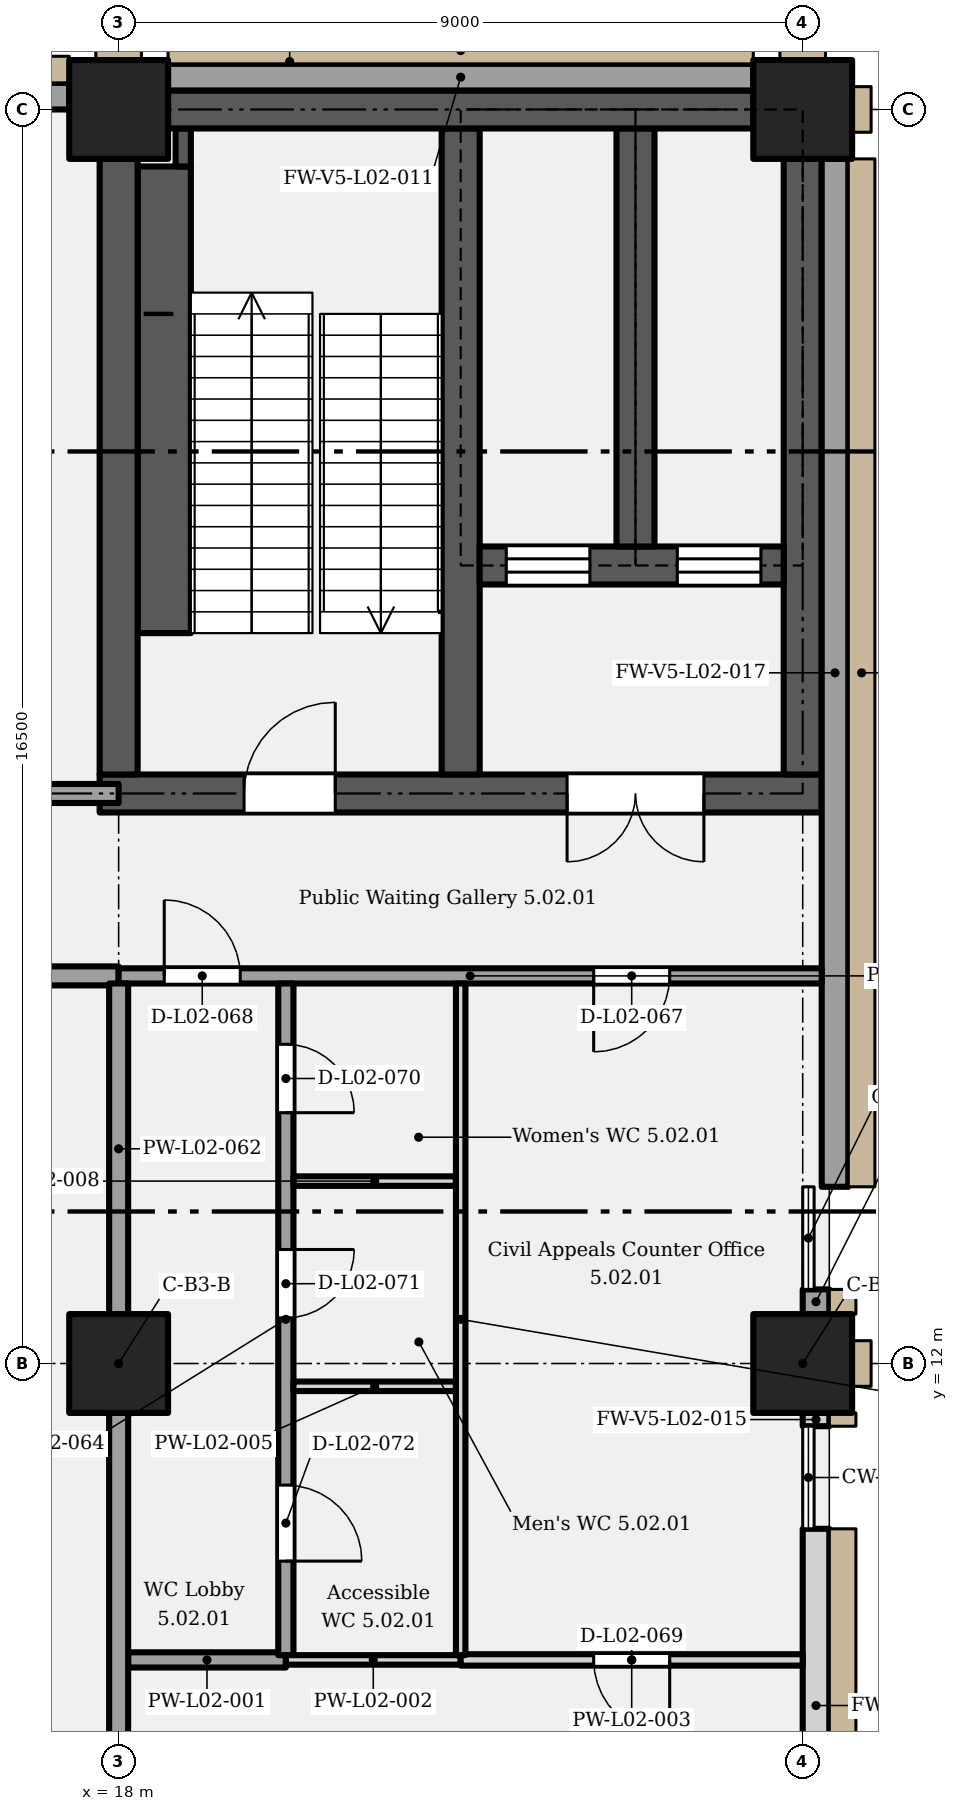
"""IFC4 building model, lengths in metres.
Left out: names, types, materials, properties, quantities, classifications, styles, units other than length and angle.
Written with IfcOpenShell. Run it as: python <this file> out.ifc"""

import sys

from ifc_helpers import new_model, si_unit, direction, frame, frame_2d, origin, origin_2d, place, context, subcontext, project, spatial, rectangle, extrude, element, fill, save


model = new_model("IFC4")
c1 = context("Model", 3, precision=1e-05, world=origin(), true_north=direction((0.0, 1.0)))
c2 = subcontext(c1, "Body", "Model", "MODEL_VIEW")
j1 = project(units=[si_unit("LENGTHUNIT", "METRE"), si_unit("PLANEANGLEUNIT", "RADIAN")], contexts=[c1])
p1 = place(None, origin())
s1 = spatial("IfcSite", under=j1, at=p1, CompositionType="ELEMENT")
p2 = place(p1, origin())
s2 = spatial("IfcBuilding", under=s1, at=p2, CompositionType="ELEMENT")
p3 = place(p2, frame((0.0, 0.0, 12.0)))
s3 = spatial("IfcBuildingStorey", under=s2, at=p3, CompositionType="ELEMENT", Elevation=12.0)
for number, where, z_axis, x_axis in (
    (1, (18.0, 12.0, 0.0), (0.0, 0.0, 1.0), (1.0, 0.0, 0.0)),
    (2, (27.0, 12.0, 0.0), (0.0, 0.0, 1.0), (1.0, 0.0, 0.0)),
    (3, (18.0, 28.5, 0.0), (0.0, 0.0, 1.0), (1.0, 0.0, 0.0)),
    (4, (27.0, 28.5, 0.0), (0.0, 0.0, 1.0), (1.0, 0.0, 0.0)),
):
    element("IfcColumn", number, at=place(p3, frame(where, z_axis=z_axis, x_axis=x_axis)), inside=s3, PredefinedType="COLUMN", context=c2, shape_type="SweptSolid", body=[
        extrude(rectangle(XDim=1.3, YDim=1.3, at=origin_2d()), origin(), (0.0, 0.0, 1.0), 5.4),
    ])
p4 = place(p3, frame((17.75, 19.5, 0.0), z_axis=(0.0, 0.0, 1.0), x_axis=(1.0, 0.0, 0.0)))
e5 = element("IfcWall", 5, at=p4, inside=s3, PredefinedType="SHEAR", context=c2, shape_type="SweptSolid", body=[
    extrude(rectangle(XDim=9.5, YDim=0.5, at=frame_2d((4.75, 0.0))), origin(), (0.0, 0.0, 1.0), 5.15),
])
p5 = place(p4, frame((1.9, 0.0, 0.0)))
e6 = element("IfcOpeningElement", 6, at=p5, cuts=e5, PredefinedType="OPENING", context=c2, shape_type="SweptSolid", body=[
    extrude(rectangle(XDim=1.2, YDim=2.1, at=frame_2d((0.6, 1.05))), frame((0.0, 0.26, 0.0), z_axis=(0.0, -1.0, 0.0), x_axis=(1.0, 0.0, 0.0)), (0.0, 0.0, 1.0), 0.52),
])
p6 = place(p4, frame((7.95, 0.0, 0.0), z_axis=(0.0, 0.0, 1.0), x_axis=(-1.0, 0.0, 0.0)))
e7 = element("IfcOpeningElement", 7, at=p6, cuts=e5, PredefinedType="OPENING", context=c2, shape_type="SweptSolid", body=[
    extrude(rectangle(XDim=1.8, YDim=2.1, at=frame_2d((0.9, 1.05))), frame((0.0, 0.26, 0.0), z_axis=(0.0, -1.0, 0.0), x_axis=(1.0, 0.0, 0.0)), (0.0, 0.0, 1.0), 0.52),
])
p7 = place(p3, frame((18.0, 19.75, 0.0), z_axis=(0.0, 0.0, 1.0), x_axis=(0.0, 1.0, 0.0)))
e8 = element("IfcWall", 8, at=p7, inside=s3, PredefinedType="SHEAR", context=c2, shape_type="SweptSolid", body=[
    extrude(rectangle(XDim=8.1, YDim=0.5, at=frame_2d((4.05, 0.0))), origin(), (0.0, 0.0, 1.0), 5.15),
])
p8 = place(p3, frame((22.5, 19.75, 0.0), z_axis=(0.0, 0.0, 1.0), x_axis=(0.0, 1.0, 0.0)))
e9 = element("IfcWall", 9, at=p8, inside=s3, PredefinedType="SHEAR", context=c2, shape_type="SweptSolid", body=[
    extrude(rectangle(XDim=8.5, YDim=0.5, at=frame_2d((4.25, 0.0))), origin(), (0.0, 0.0, 1.0), 5.15),
])
p9 = place(p3, frame((27.0, 19.75, 0.0), z_axis=(0.0, 0.0, 1.0), x_axis=(0.0, 1.0, 0.0)))
e10 = element("IfcWall", 10, at=p9, inside=s3, PredefinedType="SHEAR", context=c2, shape_type="SweptSolid", body=[
    extrude(rectangle(XDim=8.1, YDim=0.5, at=frame_2d((4.05, 0.0))), origin(), (0.0, 0.0, 1.0), 5.15),
])
p10 = place(p3, frame((22.75, 22.5, 0.0), z_axis=(0.0, 0.0, 1.0), x_axis=(1.0, 0.0, 0.0)))
e11 = element("IfcWall", 11, at=p10, inside=s3, PredefinedType="SHEAR", context=c2, shape_type="SweptSolid", body=[
    extrude(rectangle(XDim=4.0, YDim=0.5, at=frame_2d((2.0, 0.0))), origin(), (0.0, 0.0, 1.0), 5.15),
])
p11 = place(p10, frame((0.35, 0.0, 0.0)))
e12 = element("IfcOpeningElement", 12, at=p11, cuts=e11, PredefinedType="OPENING", context=c2, shape_type="SweptSolid", body=[
    extrude(rectangle(XDim=1.1, YDim=2.1, at=frame_2d((0.55, 1.05))), frame((0.0, 0.26, 0.0), z_axis=(0.0, -1.0, 0.0), x_axis=(1.0, 0.0, 0.0)), (0.0, 0.0, 1.0), 0.52),
])
p12 = place(p10, frame((2.6, 0.0, 0.0)))
e13 = element("IfcOpeningElement", 13, at=p12, cuts=e11, PredefinedType="OPENING", context=c2, shape_type="SweptSolid", body=[
    extrude(rectangle(XDim=1.1, YDim=2.1, at=frame_2d((0.55, 1.05))), frame((0.0, 0.26, 0.0), z_axis=(0.0, -1.0, 0.0), x_axis=(1.0, 0.0, 0.0)), (0.0, 0.0, 1.0), 0.52),
])
p13 = place(p3, frame((24.8, 22.75, 0.0), z_axis=(0.0, 0.0, 1.0), x_axis=(0.0, 1.0, 0.0)))
e14 = element("IfcWall", 14, at=p13, inside=s3, PredefinedType="SHEAR", context=c2, shape_type="SweptSolid", body=[
    extrude(rectangle(XDim=5.5, YDim=0.5, at=frame_2d((2.75, 0.0))), origin(), (0.0, 0.0, 1.0), 5.15),
])
p14 = place(p3, frame((18.65, 28.5, 0.0), z_axis=(0.0, 0.0, 1.0), x_axis=(1.0, 0.0, 0.0)))
e15 = element("IfcWall", 15, at=p14, inside=s3, PredefinedType="SHEAR", context=c2, shape_type="SweptSolid", body=[
    extrude(rectangle(XDim=7.7, YDim=0.5, at=frame_2d((3.85, 0.0))), origin(), (0.0, 0.0, 1.0), 5.15),
])
for number, where, z_axis, x_axis in (
    (16, (9.65, 28.675, 0.0), (0.0, 0.0, 1.0), (1.0, 0.0, 0.0)),
    (17, (18.65, 28.925, 0.0), (0.0, 0.0, 1.0), (1.0, 0.0, 0.0)),
):
    element("IfcWall", number, at=place(p3, frame(where, z_axis=z_axis, x_axis=x_axis)), inside=s3, PredefinedType="SOLIDWALL", context=c2, shape_type="SweptSolid", body=[
        extrude(rectangle(XDim=7.7, YDim=0.35, at=frame_2d((3.85, 0.0))), origin(), (0.0, 0.0, 1.0), 5.15),
    ])
p15 = place(p3, frame((27.175, 5.175, 0.0), z_axis=(0.0, 0.0, 1.0), x_axis=(0.0, 1.0, 0.0)))
e18 = element("IfcWall", 18, at=p15, inside=s3, PredefinedType="SOLIDWALL", context=c2, shape_type="SweptSolid", body=[
    extrude(rectangle(XDim=4.65, YDim=0.35, at=frame_2d((2.325, 0.0))), origin(), (0.0, 0.0, 1.0), 5.15),
])
p16 = place(p3, frame((27.175, 11.175, 0.0), z_axis=(0.0, 0.0, 1.0), x_axis=(0.0, 1.0, 0.0)))
e19 = element("IfcWall", 19, at=p16, inside=s3, PredefinedType="SOLIDWALL", context=c2, shape_type="SweptSolid", body=[
    extrude(rectangle(XDim=0.175, YDim=0.35, at=frame_2d((0.087, 0.0))), origin(), (0.0, 0.0, 1.0), 5.15),
])
p17 = place(p3, frame((27.175, 12.65, 0.0), z_axis=(0.0, 0.0, 1.0), x_axis=(0.0, 1.0, 0.0)))
e20 = element("IfcWall", 20, at=p17, inside=s3, PredefinedType="SOLIDWALL", context=c2, shape_type="SweptSolid", body=[
    extrude(rectangle(XDim=0.325, YDim=0.35, at=frame_2d((0.163, 0.0))), origin(), (0.0, 0.0, 1.0), 5.15),
])
p18 = place(p3, frame((27.425, 14.325, 0.0), z_axis=(0.0, 0.0, 1.0), x_axis=(0.0, 1.0, 0.0)))
e21 = element("IfcWall", 21, at=p18, inside=s3, PredefinedType="SOLIDWALL", context=c2, shape_type="SweptSolid", body=[
    extrude(rectangle(XDim=13.525, YDim=0.35, at=frame_2d((6.763, 0.0))), origin(), (0.0, 0.0, 1.0), 5.15),
])
p19 = place(p3, frame((18.125, 8.1, 0.0), z_axis=(0.0, 0.0, 1.0), x_axis=(1.0, 0.0, 0.0)))
e22 = element("IfcWall", 22, at=p19, inside=s3, PredefinedType="PARTITIONING", context=c2, shape_type="SweptSolid", body=[
    extrude(rectangle(XDim=2.075, YDim=0.2, at=frame_2d((1.038, 0.0))), origin(), (0.0, 0.0, 1.0), 5.15),
])
p20 = place(p3, frame((20.2, 8.1, 0.0), z_axis=(0.0, 0.0, 1.0), x_axis=(1.0, 0.0, 0.0)))
e23 = element("IfcWall", 23, at=p20, inside=s3, PredefinedType="PARTITIONING", context=c2, shape_type="SweptSolid", body=[
    extrude(rectangle(XDim=2.3, YDim=0.125, at=frame_2d((1.15, 0.0))), origin(), (0.0, 0.0, 1.0), 5.15),
])
p21 = place(p3, frame((22.5, 8.1, 0.0), z_axis=(0.0, 0.0, 1.0), x_axis=(1.0, 0.0, 0.0)))
e24 = element("IfcWall", 24, at=p21, inside=s3, PredefinedType="PARTITIONING", context=c2, shape_type="SweptSolid", body=[
    extrude(rectangle(XDim=4.5, YDim=0.15, at=frame_2d((2.25, 0.0))), origin(), (0.0, 0.0, 1.0), 5.15),
])
p22 = place(p21, frame((2.75, 0.0, 0.0), z_axis=(0.0, 0.0, 1.0), x_axis=(-1.0, 0.0, 0.0)))
e25 = element("IfcOpeningElement", 25, at=p22, cuts=e24, PredefinedType="OPENING", context=c2, shape_type="SweptSolid", body=[
    extrude(rectangle(XDim=1.0, YDim=2.1, at=frame_2d((0.5, 1.05))), frame((0.0, 0.085, 0.0), z_axis=(0.0, -1.0, 0.0), x_axis=(1.0, 0.0, 0.0)), (0.0, 0.0, 1.0), 0.17),
])
p23 = place(p3, frame((20.3, 11.7, 0.0), z_axis=(0.0, 0.0, 1.0), x_axis=(1.0, 0.0, 0.0)))
e26 = element("IfcWall", 26, at=p23, inside=s3, PredefinedType="PARTITIONING", context=c2, shape_type="SweptSolid", body=[
    extrude(rectangle(XDim=2.137, YDim=0.125, at=frame_2d((1.069, 0.0))), origin(), (0.0, 0.0, 1.0), 4.4),
])
p24 = place(p3, frame((20.3, 14.4, 0.0), z_axis=(0.0, 0.0, 1.0), x_axis=(1.0, 0.0, 0.0)))
e27 = element("IfcWall", 27, at=p24, inside=s3, PredefinedType="PARTITIONING", context=c2, shape_type="SweptSolid", body=[
    extrude(rectangle(XDim=2.137, YDim=0.125, at=frame_2d((1.069, 0.0))), origin(), (0.0, 0.0, 1.0), 5.15),
])
p25 = place(p3, frame((9.0, 17.1, 0.0), z_axis=(0.0, 0.0, 1.0), x_axis=(1.0, 0.0, 0.0)))
e28 = element("IfcWall", 28, at=p25, inside=s3, PredefinedType="PARTITIONING", context=c2, shape_type="SweptSolid", body=[
    extrude(rectangle(XDim=9.0, YDim=0.25, at=frame_2d((4.5, 0.0))), origin(), (0.0, 0.0, 1.0), 5.15),
])
p26 = place(p25, frame((6.9, 0.0, 0.0), z_axis=(0.0, 0.0, 1.0), x_axis=(-1.0, 0.0, 0.0)))
e29 = element("IfcOpeningElement", 29, at=p26, cuts=e28, PredefinedType="OPENING", context=c2, shape_type="SweptSolid", body=[
    extrude(rectangle(XDim=1.8, YDim=2.4, at=frame_2d((0.9, 1.2))), frame((0.0, 0.135, 0.0), z_axis=(0.0, -1.0, 0.0), x_axis=(1.0, 0.0, 0.0)), (0.0, 0.0, 1.0), 0.27),
])
p27 = place(p25, frame((2.0, 0.0, 0.0), z_axis=(0.0, 0.0, 1.0), x_axis=(-1.0, 0.0, 0.0)))
e30 = element("IfcOpeningElement", 30, at=p27, cuts=e28, PredefinedType="OPENING", context=c2, shape_type="SweptSolid", body=[
    extrude(rectangle(XDim=1.0, YDim=2.1, at=frame_2d((0.5, 1.05))), frame((0.0, 0.135, 0.0), z_axis=(0.0, -1.0, 0.0), x_axis=(1.0, 0.0, 0.0)), (0.0, 0.0, 1.0), 0.27),
])
p28 = place(p3, frame((18.0, 17.1, 0.0), z_axis=(0.0, 0.0, 1.0), x_axis=(1.0, 0.0, 0.0)))
e31 = element("IfcWall", 31, at=p28, inside=s3, PredefinedType="PARTITIONING", context=c2, shape_type="SweptSolid", body=[
    extrude(rectangle(XDim=9.25, YDim=0.2, at=frame_2d((4.625, 0.0))), origin(), (0.0, 0.0, 1.0), 5.15),
])
p29 = place(p28, frame((7.25, 0.0, 0.0), z_axis=(0.0, 0.0, 1.0), x_axis=(-1.0, 0.0, 0.0)))
e32 = element("IfcOpeningElement", 32, at=p29, cuts=e31, PredefinedType="OPENING", context=c2, shape_type="SweptSolid", body=[
    extrude(rectangle(XDim=1.0, YDim=2.1, at=frame_2d((0.5, 1.05))), frame((0.0, 0.11, 0.0), z_axis=(0.0, -1.0, 0.0), x_axis=(1.0, 0.0, 0.0)), (0.0, 0.0, 1.0), 0.22),
])
p30 = place(p28, frame((0.6, 0.0, 0.0)))
e33 = element("IfcOpeningElement", 33, at=p30, cuts=e31, PredefinedType="OPENING", context=c2, shape_type="SweptSolid", body=[
    extrude(rectangle(XDim=1.0, YDim=2.1, at=frame_2d((0.5, 1.05))), frame((0.0, 0.11, 0.0), z_axis=(0.0, -1.0, 0.0), x_axis=(1.0, 0.0, 0.0)), (0.0, 0.0, 1.0), 0.22),
])
p31 = place(p3, frame((9.0, 19.5, 0.0), z_axis=(0.0, 0.0, 1.0), x_axis=(1.0, 0.0, 0.0)))
e34 = element("IfcWall", 34, at=p31, inside=s3, PredefinedType="PARTITIONING", context=c2, shape_type="SweptSolid", body=[
    extrude(rectangle(XDim=9.0, YDim=0.25, at=frame_2d((4.5, 0.0))), origin(), (0.0, 0.0, 1.0), 5.15),
])
p32 = place(p31, frame((5.1, 0.0, 0.0)))
e35 = element("IfcOpeningElement", 35, at=p32, cuts=e34, PredefinedType="OPENING", context=c2, shape_type="SweptSolid", body=[
    extrude(rectangle(XDim=1.8, YDim=2.4, at=frame_2d((0.9, 1.2))), frame((0.0, 0.135, 0.0), z_axis=(0.0, -1.0, 0.0), x_axis=(1.0, 0.0, 0.0)), (0.0, 0.0, 1.0), 0.27),
])
p33 = place(p31, frame((1.0, 0.0, 0.0)))
e36 = element("IfcOpeningElement", 36, at=p33, cuts=e34, PredefinedType="OPENING", context=c2, shape_type="SweptSolid", body=[
    extrude(rectangle(XDim=1.0, YDim=2.1, at=frame_2d((0.5, 1.05))), frame((0.0, 0.135, 0.0), z_axis=(0.0, -1.0, 0.0), x_axis=(1.0, 0.0, 0.0)), (0.0, 0.0, 1.0), 0.27),
])
p34 = place(p3, frame((18.0, 0.65, 0.0), z_axis=(0.0, 0.0, 1.0), x_axis=(0.0, 1.0, 0.0)))
e37 = element("IfcWall", 37, at=p34, inside=s3, PredefinedType="PARTITIONING", context=c2, shape_type="SweptSolid", body=[
    extrude(rectangle(XDim=10.7, YDim=0.25, at=frame_2d((5.35, 0.0))), origin(), (0.0, 0.0, 1.0), 4.4),
])
p35 = place(p3, frame((18.0, 12.65, 0.0), z_axis=(0.0, 0.0, 1.0), x_axis=(0.0, 1.0, 0.0)))
e38 = element("IfcWall", 38, at=p35, inside=s3, PredefinedType="PARTITIONING", context=c2, shape_type="SweptSolid", body=[
    extrude(rectangle(XDim=4.35, YDim=0.25, at=frame_2d((2.175, 0.0))), origin(), (0.0, 0.0, 1.0), 4.2),
])
p36 = place(p3, frame((20.2, 8.163, 0.0), z_axis=(0.0, 0.0, 1.0), x_axis=(0.0, 1.0, 0.0)))
e39 = element("IfcWall", 39, at=p36, inside=s3, PredefinedType="PARTITIONING", context=c2, shape_type="SweptSolid", body=[
    extrude(rectangle(XDim=8.837, YDim=0.2, at=frame_2d((4.419, 0.0))), origin(), (0.0, 0.0, 1.0), 5.15),
])
p37 = place(p36, frame((8.037, 0.0, 0.0), z_axis=(0.0, 0.0, 1.0), x_axis=(-1.0, 0.0, 0.0)))
e40 = element("IfcOpeningElement", 40, at=p37, cuts=e39, PredefinedType="OPENING", context=c2, shape_type="SweptSolid", body=[
    extrude(rectangle(XDim=0.9, YDim=2.1, at=frame_2d((0.45, 1.05))), frame((0.0, 0.11, 0.0), z_axis=(0.0, -1.0, 0.0), x_axis=(1.0, 0.0, 0.0)), (0.0, 0.0, 1.0), 0.22),
])
p38 = place(p36, frame((5.337, 0.0, 0.0), z_axis=(0.0, 0.0, 1.0), x_axis=(-1.0, 0.0, 0.0)))
e41 = element("IfcOpeningElement", 41, at=p38, cuts=e39, PredefinedType="OPENING", context=c2, shape_type="SweptSolid", body=[
    extrude(rectangle(XDim=0.9, YDim=2.1, at=frame_2d((0.45, 1.05))), frame((0.0, 0.11, 0.0), z_axis=(0.0, -1.0, 0.0), x_axis=(1.0, 0.0, 0.0)), (0.0, 0.0, 1.0), 0.22),
])
p39 = place(p36, frame((2.238, 0.0, 0.0), z_axis=(0.0, 0.0, 1.0), x_axis=(-1.0, 0.0, 0.0)))
e42 = element("IfcOpeningElement", 42, at=p39, cuts=e39, PredefinedType="OPENING", context=c2, shape_type="SweptSolid", body=[
    extrude(rectangle(XDim=1.0, YDim=2.1, at=frame_2d((0.5, 1.05))), frame((0.0, 0.11, 0.0), z_axis=(0.0, -1.0, 0.0), x_axis=(1.0, 0.0, 0.0)), (0.0, 0.0, 1.0), 0.22),
])
p40 = place(p3, frame((22.5, 8.163, 0.0), z_axis=(0.0, 0.0, 1.0), x_axis=(0.0, 1.0, 0.0)))
e43 = element("IfcWall", 43, at=p40, inside=s3, PredefinedType="PARTITIONING", context=c2, shape_type="SweptSolid", body=[
    extrude(rectangle(XDim=8.837, YDim=0.125, at=frame_2d((4.419, 0.0))), origin(), (0.0, 0.0, 1.0), 5.15),
])
p41 = place(p3, frame((18.6, 21.61, 0.0), z_axis=(0.0, 0.0, 1.0), x_axis=(0.0, 1.0, 0.0)))
e44 = element("IfcWall", 44, at=p41, inside=s3, PredefinedType="SHEAR", context=c2, shape_type="SweptSolid", body=[
    extrude(rectangle(XDim=6.14, YDim=0.7, at=frame_2d((3.07, 0.0))), origin(), (0.0, 0.0, 1.0), 2.587),
])
p42 = place(p3, frame((18.85, 27.75, 0.0), z_axis=(0.0, 0.0, 1.0), x_axis=(0.0, 1.0, 0.0)))
e45 = element("IfcWall", 45, at=p42, inside=s3, PredefinedType="SHEAR", context=c2, shape_type="SweptSolid", body=[
    extrude(rectangle(XDim=0.5, YDim=0.2, at=frame_2d((0.25, 0.0))), origin(), (0.0, 0.0, 1.0), 2.587),
])
p43 = place(p5, origin())
e46 = element("IfcDoor", 46, at=p43, inside=s3, OperationType="SINGLE_SWING_RIGHT", PredefinedType="DOOR", context=c2, shape_type="SweptSolid", body=[
    extrude(rectangle(XDim=1.2, YDim=2.1, at=frame_2d((0.6, 1.05))), frame((0.0, 0.025, 0.0), z_axis=(0.0, -1.0, 0.0), x_axis=(1.0, 0.0, 0.0)), (0.0, 0.0, 1.0), 0.05),
])
fill(e6, e46)
p44 = place(p6, origin())
e47 = element("IfcDoor", 47, at=p44, inside=s3, OperationType="DOUBLE_DOOR_SINGLE_SWING", PredefinedType="DOOR", context=c2, shape_type="SweptSolid", body=[
    extrude(rectangle(XDim=1.8, YDim=2.1, at=frame_2d((0.9, 1.05))), frame((0.0, 0.025, 0.0), z_axis=(0.0, -1.0, 0.0), x_axis=(1.0, 0.0, 0.0)), (0.0, 0.0, 1.0), 0.05),
])
fill(e7, e47)
p45 = place(p11, origin())
e48 = element("IfcDoor", 48, at=p45, inside=s3, OperationType="SLIDING_TO_LEFT", PredefinedType="DOOR", context=c2, shape_type="SweptSolid", body=[
    extrude(rectangle(XDim=1.1, YDim=2.1, at=frame_2d((0.55, 1.05))), frame((0.0, 0.025, 0.0), z_axis=(0.0, -1.0, 0.0), x_axis=(1.0, 0.0, 0.0)), (0.0, 0.0, 1.0), 0.05),
])
fill(e12, e48)
p46 = place(p12, origin())
e49 = element("IfcDoor", 49, at=p46, inside=s3, OperationType="SLIDING_TO_LEFT", PredefinedType="DOOR", context=c2, shape_type="SweptSolid", body=[
    extrude(rectangle(XDim=1.1, YDim=2.1, at=frame_2d((0.55, 1.05))), frame((0.0, 0.025, 0.0), z_axis=(0.0, -1.0, 0.0), x_axis=(1.0, 0.0, 0.0)), (0.0, 0.0, 1.0), 0.05),
])
fill(e13, e49)
p47 = place(p29, origin())
e50 = element("IfcDoor", 50, at=p47, inside=s3, OperationType="SINGLE_SWING_RIGHT", PredefinedType="DOOR", context=c2, shape_type="SweptSolid", body=[
    extrude(rectangle(XDim=1.0, YDim=2.1, at=frame_2d((0.5, 1.05))), frame((0.0, 0.025, 0.0), z_axis=(0.0, -1.0, 0.0), x_axis=(1.0, 0.0, 0.0)), (0.0, 0.0, 1.0), 0.05),
])
fill(e32, e50)
p48 = place(p30, origin())
e51 = element("IfcDoor", 51, at=p48, inside=s3, OperationType="SINGLE_SWING_LEFT", PredefinedType="DOOR", context=c2, shape_type="SweptSolid", body=[
    extrude(rectangle(XDim=1.0, YDim=2.1, at=frame_2d((0.5, 1.05))), frame((0.0, 0.025, 0.0), z_axis=(0.0, -1.0, 0.0), x_axis=(1.0, 0.0, 0.0)), (0.0, 0.0, 1.0), 0.05),
])
fill(e33, e51)
p49 = place(p22, origin())
e52 = element("IfcDoor", 52, at=p49, inside=s3, OperationType="SINGLE_SWING_LEFT", PredefinedType="DOOR", context=c2, shape_type="SweptSolid", body=[
    extrude(rectangle(XDim=1.0, YDim=2.1, at=frame_2d((0.5, 1.05))), frame((0.0, 0.025, 0.0), z_axis=(0.0, -1.0, 0.0), x_axis=(1.0, 0.0, 0.0)), (0.0, 0.0, 1.0), 0.05),
])
fill(e25, e52)
p50 = place(p37, origin())
e53 = element("IfcDoor", 53, at=p50, inside=s3, OperationType="SINGLE_SWING_RIGHT", PredefinedType="DOOR", context=c2, shape_type="SweptSolid", body=[
    extrude(rectangle(XDim=0.9, YDim=2.1, at=frame_2d((0.45, 1.05))), frame((0.0, 0.025, 0.0), z_axis=(0.0, -1.0, 0.0), x_axis=(1.0, 0.0, 0.0)), (0.0, 0.0, 1.0), 0.05),
])
fill(e40, e53)
p51 = place(p38, origin())
e54 = element("IfcDoor", 54, at=p51, inside=s3, OperationType="SINGLE_SWING_LEFT", PredefinedType="DOOR", context=c2, shape_type="SweptSolid", body=[
    extrude(rectangle(XDim=0.9, YDim=2.1, at=frame_2d((0.45, 1.05))), frame((0.0, 0.025, 0.0), z_axis=(0.0, -1.0, 0.0), x_axis=(1.0, 0.0, 0.0)), (0.0, 0.0, 1.0), 0.05),
])
fill(e41, e54)
p52 = place(p39, origin())
e55 = element("IfcDoor", 55, at=p52, inside=s3, OperationType="SINGLE_SWING_RIGHT", PredefinedType="DOOR", context=c2, shape_type="SweptSolid", body=[
    extrude(rectangle(XDim=1.0, YDim=2.1, at=frame_2d((0.5, 1.05))), frame((0.0, 0.025, 0.0), z_axis=(0.0, -1.0, 0.0), x_axis=(1.0, 0.0, 0.0)), (0.0, 0.0, 1.0), 0.05),
])
fill(e42, e55)
save(model, sys.argv[1])
